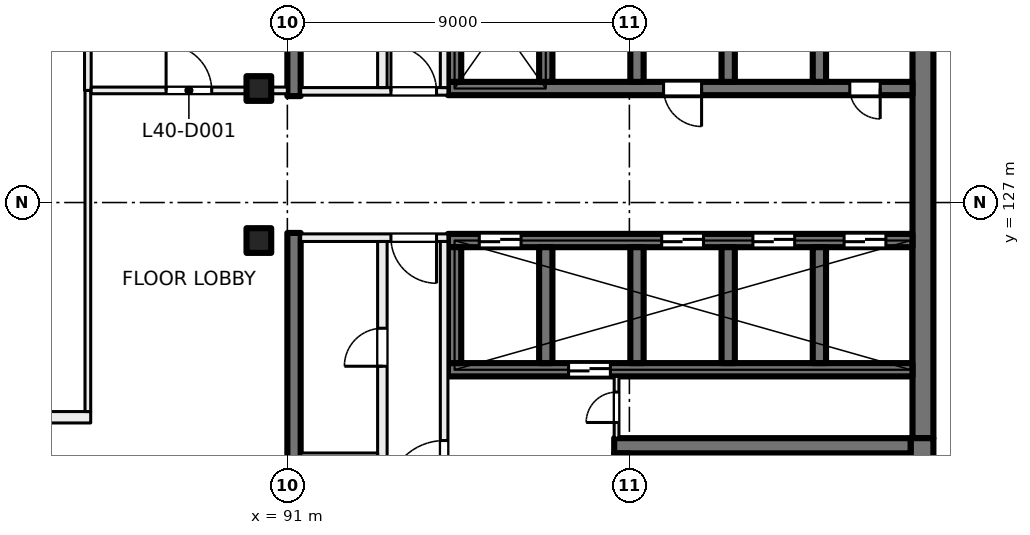
"""IFC4 building model, lengths in metres.
Left out: names, types, materials, properties, quantities, classifications, styles, units other than length and angle.
Written with IfcOpenShell. Run it as: python <this file> out.ifc"""

import sys

from ifc_helpers import new_model, si_unit, direction, frame, frame_2d, origin, origin_2d, place, context, subcontext, project, spatial, rectangle, extrude, element, fill, save


model = new_model("IFC4")
c1 = context("Model", 3, precision=1e-05, world=origin(), true_north=direction((0.0, 1.0)))
c2 = subcontext(c1, "Body", "Model", "MODEL_VIEW")
j1 = project(units=[si_unit("LENGTHUNIT", "METRE"), si_unit("PLANEANGLEUNIT", "RADIAN")], contexts=[c1])
p1 = place(None, origin())
s1 = spatial("IfcSite", under=j1, at=p1, CompositionType="ELEMENT")
p2 = place(p1, origin())
s2 = spatial("IfcBuilding", under=s1, at=p2, CompositionType="ELEMENT")
p3 = place(p2, frame((0.0, 0.0, 170.5)))
s3 = spatial("IfcBuildingStorey", under=s2, at=p3, CompositionType="ELEMENT", Elevation=170.5)
for number, where, z_axis, x_axis in (
    (1, (90.25, 130.0, 0.0), (0.0, 0.0, 1.0), (1.0, 0.0, 0.0)),
    (2, (90.25, 126.0, 0.0), (0.0, 0.0, 1.0), (1.0, 0.0, 0.0)),
):
    element("IfcColumn", number, at=place(p3, frame(where, z_axis=z_axis, x_axis=x_axis)), inside=s3, PredefinedType="COLUMN", context=c2, shape_type="SweptSolid", body=[
        extrude(rectangle(XDim=0.65, YDim=0.65, at=origin_2d()), origin(), (0.0, 0.0, 1.0), 4.0),
    ])
p4 = place(p3, frame((107.725, 135.2, 0.0), z_axis=(0.0, 0.0, 1.0), x_axis=(0.0, -1.0, 0.0)))
e3 = element("IfcWall", 3, at=p4, inside=s3, PredefinedType="SHEAR", context=c2, shape_type="SweptSolid", body=[
    extrude(rectangle(XDim=14.4, YDim=0.55, at=frame_2d((7.2, 0.0))), origin(), (0.0, 0.0, 1.0), 4.0),
])
p5 = place(p3, frame((107.7, 120.8, 0.0), z_axis=(0.0, 0.0, 1.0), x_axis=(0.0, -1.0, 0.0)))
e4 = element("IfcWall", 4, at=p5, inside=s3, PredefinedType="SHEAR", context=c2, shape_type="SweptSolid", body=[
    extrude(rectangle(XDim=3.8, YDim=0.6, at=frame_2d((1.9, 0.0))), origin(), (0.0, 0.0, 1.0), 4.0),
])
p6 = place(p3, frame((107.4, 120.6, 0.0), z_axis=(0.0, 0.0, 1.0), x_axis=(-1.0, 0.0, 0.0)))
e5 = element("IfcWall", 5, at=p6, inside=s3, PredefinedType="SHEAR", context=c2, shape_type="SweptSolid", body=[
    extrude(rectangle(XDim=7.8, YDim=0.4, at=frame_2d((3.9, 0.0))), origin(), (0.0, 0.0, 1.0), 4.0),
])
p7 = place(p3, frame((99.8, 120.4, 0.0), z_axis=(0.0, 0.0, 1.0), x_axis=(0.0, -1.0, 0.0)))
e6 = element("IfcWall", 6, at=p7, inside=s3, PredefinedType="SHEAR", context=c2, shape_type="SweptSolid", body=[
    extrude(rectangle(XDim=2.8, YDim=0.4, at=frame_2d((1.4, 0.0))), origin(), (0.0, 0.0, 1.0), 4.0),
])
p8 = place(p7, frame((0.925, 0.0, 0.0)))
e7 = element("IfcOpeningElement", 7, at=p8, cuts=e6, PredefinedType="OPENING", context=c2, shape_type="SweptSolid", body=[
    extrude(rectangle(XDim=1.0, YDim=2.1, at=frame_2d((0.5, 1.05))), frame((0.0, 0.21, 0.0), z_axis=(0.0, -1.0, 0.0), x_axis=(1.0, 0.0, 0.0)), (0.0, 0.0, 1.0), 0.42),
])
p9 = place(p3, frame((107.45, 130.0, 0.0), z_axis=(0.0, 0.0, 1.0), x_axis=(-1.0, 0.0, 0.0)))
e8 = element("IfcWall", 8, at=p9, inside=s3, PredefinedType="SHEAR", context=c2, shape_type="SweptSolid", body=[
    extrude(rectangle(XDim=12.225, YDim=0.35, at=frame_2d((6.112, 0.0))), origin(), (0.0, 0.0, 1.0), 4.0),
])
p10 = place(p9, frame((0.85, 0.0, 0.0)))
e9 = element("IfcOpeningElement", 9, at=p10, cuts=e8, PredefinedType="OPENING", context=c2, shape_type="SweptSolid", body=[
    extrude(rectangle(XDim=0.8, YDim=2.1, at=frame_2d((0.4, 1.05))), frame((0.0, 0.185, 0.0), z_axis=(0.0, -1.0, 0.0), x_axis=(1.0, 0.0, 0.0)), (0.0, 0.0, 1.0), 0.37),
])
p11 = place(p9, frame((5.55, 0.0, 0.0)))
e10 = element("IfcOpeningElement", 10, at=p11, cuts=e8, PredefinedType="OPENING", context=c2, shape_type="SweptSolid", body=[
    extrude(rectangle(XDim=1.0, YDim=2.1, at=frame_2d((0.5, 1.05))), frame((0.0, 0.185, 0.0), z_axis=(0.0, -1.0, 0.0), x_axis=(1.0, 0.0, 0.0)), (0.0, 0.0, 1.0), 0.37),
])
for number, where, z_axis, x_axis in (
    (11, (105.0, 133.225, 0.0), (0.0, 0.0, 1.0), (0.0, -1.0, 0.0)),
    (12, (102.6, 133.225, 0.0), (0.0, 0.0, 1.0), (0.0, -1.0, 0.0)),
    (13, (100.2, 133.225, 0.0), (0.0, 0.0, 1.0), (0.0, -1.0, 0.0)),
    (14, (97.8, 133.225, 0.0), (0.0, 0.0, 1.0), (0.0, -1.0, 0.0)),
    (15, (95.4, 133.225, 0.0), (0.0, 0.0, 1.0), (0.0, -1.0, 0.0)),
):
    element("IfcWall", number, at=place(p3, frame(where, z_axis=z_axis, x_axis=x_axis)), inside=s3, PredefinedType="SHEAR", context=c2, shape_type="SweptSolid", body=[
        extrude(rectangle(XDim=3.05, YDim=0.35, at=frame_2d((1.525, 0.0))), origin(), (0.0, 0.0, 1.0), 4.0),
    ])
p12 = place(p3, frame((107.45, 126.0, 0.0), z_axis=(0.0, 0.0, 1.0), x_axis=(-1.0, 0.0, 0.0)))
e16 = element("IfcWall", 16, at=p12, inside=s3, PredefinedType="SHEAR", context=c2, shape_type="SweptSolid", body=[
    extrude(rectangle(XDim=12.225, YDim=0.35, at=frame_2d((6.112, 0.0))), origin(), (0.0, 0.0, 1.0), 4.0),
])
p13 = place(p12, frame((0.7, 0.0, 0.0)))
e17 = element("IfcOpeningElement", 17, at=p13, cuts=e16, PredefinedType="OPENING", context=c2, shape_type="SweptSolid", body=[
    extrude(rectangle(XDim=1.1, YDim=2.1, at=frame_2d((0.55, 1.05))), frame((0.0, 0.185, 0.0), z_axis=(0.0, -1.0, 0.0), x_axis=(1.0, 0.0, 0.0)), (0.0, 0.0, 1.0), 0.37),
])
p14 = place(p12, frame((3.1, 0.0, 0.0)))
e18 = element("IfcOpeningElement", 18, at=p14, cuts=e16, PredefinedType="OPENING", context=c2, shape_type="SweptSolid", body=[
    extrude(rectangle(XDim=1.1, YDim=2.1, at=frame_2d((0.55, 1.05))), frame((0.0, 0.185, 0.0), z_axis=(0.0, -1.0, 0.0), x_axis=(1.0, 0.0, 0.0)), (0.0, 0.0, 1.0), 0.37),
])
p15 = place(p12, frame((5.5, 0.0, 0.0)))
e19 = element("IfcOpeningElement", 19, at=p15, cuts=e16, PredefinedType="OPENING", context=c2, shape_type="SweptSolid", body=[
    extrude(rectangle(XDim=1.1, YDim=2.1, at=frame_2d((0.55, 1.05))), frame((0.0, 0.185, 0.0), z_axis=(0.0, -1.0, 0.0), x_axis=(1.0, 0.0, 0.0)), (0.0, 0.0, 1.0), 0.37),
])
p16 = place(p12, frame((10.3, 0.0, 0.0)))
e20 = element("IfcOpeningElement", 20, at=p16, cuts=e16, PredefinedType="OPENING", context=c2, shape_type="SweptSolid", body=[
    extrude(rectangle(XDim=1.1, YDim=2.1, at=frame_2d((0.55, 1.05))), frame((0.0, 0.185, 0.0), z_axis=(0.0, -1.0, 0.0), x_axis=(1.0, 0.0, 0.0)), (0.0, 0.0, 1.0), 0.37),
])
p17 = place(p3, frame((107.45, 122.6, 0.0), z_axis=(0.0, 0.0, 1.0), x_axis=(-1.0, 0.0, 0.0)))
e21 = element("IfcWall", 21, at=p17, inside=s3, PredefinedType="SHEAR", context=c2, shape_type="SweptSolid", body=[
    extrude(rectangle(XDim=12.225, YDim=0.35, at=frame_2d((6.112, 0.0))), origin(), (0.0, 0.0, 1.0), 4.0),
])
p18 = place(p17, frame((7.95, 0.0, 0.0)))
e22 = element("IfcOpeningElement", 22, at=p18, cuts=e21, PredefinedType="OPENING", context=c2, shape_type="SweptSolid", body=[
    extrude(rectangle(XDim=1.1, YDim=2.1, at=frame_2d((0.55, 1.05))), frame((0.0, 0.185, 0.0), z_axis=(0.0, -1.0, 0.0), x_axis=(1.0, 0.0, 0.0)), (0.0, 0.0, 1.0), 0.37),
])
for number, where, z_axis, x_axis in (
    (23, (105.0, 125.825, 0.0), (0.0, 0.0, 1.0), (0.0, -1.0, 0.0)),
    (24, (102.6, 125.825, 0.0), (0.0, 0.0, 1.0), (0.0, -1.0, 0.0)),
    (25, (100.2, 125.825, 0.0), (0.0, 0.0, 1.0), (0.0, -1.0, 0.0)),
    (26, (97.8, 125.825, 0.0), (0.0, 0.0, 1.0), (0.0, -1.0, 0.0)),
    (27, (95.4, 125.825, 0.0), (0.0, 0.0, 1.0), (0.0, -1.0, 0.0)),
):
    element("IfcWall", number, at=place(p3, frame(where, z_axis=z_axis, x_axis=x_axis)), inside=s3, PredefinedType="SHEAR", context=c2, shape_type="SweptSolid", body=[
        extrude(rectangle(XDim=3.05, YDim=0.35, at=frame_2d((1.525, 0.0))), origin(), (0.0, 0.0, 1.0), 4.0),
    ])
for number, where, z_axis, x_axis in (
    (28, (91.175, 138.45, 0.0), (0.0, 0.0, 1.0), (0.0, -1.0, 0.0)),
    (29, (91.175, 126.2, 0.0), (0.0, 0.0, 1.0), (0.0, -1.0, 0.0)),
):
    element("IfcWall", number, at=place(p3, frame(where, z_axis=z_axis, x_axis=x_axis)), inside=s3, PredefinedType="SHEAR", context=c2, shape_type="SweptSolid", body=[
        extrude(rectangle(XDim=8.65, YDim=0.35, at=frame_2d((4.325, 0.0))), origin(), (0.0, 0.0, 1.0), 4.0),
    ])
p19 = place(p3, frame((95.225, 126.075, 0.0), z_axis=(0.0, 0.0, 1.0), x_axis=(-1.0, 0.0, 0.0)))
e30 = element("IfcWall", 30, at=p19, inside=s3, PredefinedType="PARTITIONING", context=c2, shape_type="SweptSolid", body=[
    extrude(rectangle(XDim=3.875, YDim=0.2, at=frame_2d((1.938, 0.0))), origin(), (0.0, 0.0, 1.0), 3.625),
])
p20 = place(p19, frame((0.3, 0.0, 0.0)))
e31 = element("IfcOpeningElement", 31, at=p20, cuts=e30, PredefinedType="OPENING", context=c2, shape_type="SweptSolid", body=[
    extrude(rectangle(XDim=1.2, YDim=2.1, at=frame_2d((0.6, 1.05))), frame((0.0, 0.11, 0.0), z_axis=(0.0, -1.0, 0.0), x_axis=(1.0, 0.0, 0.0)), (0.0, 0.0, 1.0), 0.22),
])
p21 = place(p3, frame((95.125, 117.55, 0.0), z_axis=(0.0, 0.0, 1.0), x_axis=(0.0, 1.0, 0.0)))
e32 = element("IfcWall", 32, at=p21, inside=s3, PredefinedType="PARTITIONING", context=c2, shape_type="SweptSolid", body=[
    extrude(rectangle(XDim=8.425, YDim=0.2, at=frame_2d((4.212, 0.0))), origin(), (0.0, 0.0, 1.0), 3.625),
])
p22 = place(p21, frame((1.688, 0.0, 0.0)))
e33 = element("IfcOpeningElement", 33, at=p22, cuts=e32, PredefinedType="OPENING", context=c2, shape_type="SweptSolid", body=[
    extrude(rectangle(XDim=1.5, YDim=2.1, at=frame_2d((0.75, 1.05))), frame((0.0, 0.11, 0.0), z_axis=(0.0, -1.0, 0.0), x_axis=(1.0, 0.0, 0.0)), (0.0, 0.0, 1.0), 0.22),
])
p23 = place(p3, frame((93.5, 117.55, 0.0), z_axis=(0.0, 0.0, 1.0), x_axis=(0.0, 1.0, 0.0)))
e34 = element("IfcWall", 34, at=p23, inside=s3, PredefinedType="PARTITIONING", context=c2, shape_type="SweptSolid", body=[
    extrude(rectangle(XDim=8.425, YDim=0.25, at=frame_2d((4.212, 0.0))), origin(), (0.0, 0.0, 1.0), 3.625),
])
p24 = place(p23, frame((5.143, 0.0, 0.0)))
e35 = element("IfcOpeningElement", 35, at=p24, cuts=e34, PredefinedType="OPENING", context=c2, shape_type="SweptSolid", body=[
    extrude(rectangle(XDim=1.0, YDim=2.1, at=frame_2d((0.5, 1.05))), frame((0.0, 0.135, 0.0), z_axis=(0.0, -1.0, 0.0), x_axis=(1.0, 0.0, 0.0)), (0.0, 0.0, 1.0), 0.27),
])
p25 = place(p23, frame((0.88, 0.0, 0.0)))
e36 = element("IfcOpeningElement", 36, at=p25, cuts=e34, PredefinedType="OPENING", context=c2, shape_type="SweptSolid", body=[
    extrude(rectangle(XDim=1.0, YDim=2.1, at=frame_2d((0.5, 1.05))), frame((0.0, 0.135, 0.0), z_axis=(0.0, -1.0, 0.0), x_axis=(1.0, 0.0, 0.0)), (0.0, 0.0, 1.0), 0.27),
])
p26 = place(p3, frame((99.663, 120.8, 0.0), z_axis=(0.0, 0.0, 1.0), x_axis=(0.0, 1.0, 0.0)))
e37 = element("IfcWall", 37, at=p26, inside=s3, PredefinedType="PARTITIONING", context=c2, shape_type="SweptSolid", body=[
    extrude(rectangle(XDim=1.625, YDim=0.125, at=frame_2d((0.812, 0.0))), origin(), (0.0, 0.0, 1.0), 3.625),
])
p27 = place(p26, frame((0.413, 0.0, 0.0)))
e38 = element("IfcOpeningElement", 38, at=p27, cuts=e37, PredefinedType="OPENING", context=c2, shape_type="SweptSolid", body=[
    extrude(rectangle(XDim=0.8, YDim=2.1, at=frame_2d((0.4, 1.05))), frame((0.0, 0.073, 0.0), z_axis=(0.0, -1.0, 0.0), x_axis=(1.0, 0.0, 0.0)), (0.0, 0.0, 1.0), 0.145),
])
p28 = place(p3, frame((93.375, 120.36, 0.0), z_axis=(0.0, 0.0, 1.0), x_axis=(-1.0, 0.0, 0.0)))
e39 = element("IfcWall", 39, at=p28, inside=s3, PredefinedType="PARTITIONING", context=c2, shape_type="SweptSolid", body=[
    extrude(rectangle(XDim=2.025, YDim=0.1, at=frame_2d((1.012, 0.0))), origin(), (0.0, 0.0, 1.0), 3.625),
])
p29 = place(p3, frame((91.35, 129.925, 0.0), z_axis=(0.0, 0.0, 1.0), x_axis=(1.0, 0.0, 0.0)))
e40 = element("IfcWall", 40, at=p29, inside=s3, PredefinedType="PARTITIONING", context=c2, shape_type="SweptSolid", body=[
    extrude(rectangle(XDim=3.875, YDim=0.2, at=frame_2d((1.938, 0.0))), origin(), (0.0, 0.0, 1.0), 3.625),
])
p30 = place(p29, frame((2.375, 0.0, 0.0)))
e41 = element("IfcOpeningElement", 41, at=p30, cuts=e40, PredefinedType="OPENING", context=c2, shape_type="SweptSolid", body=[
    extrude(rectangle(XDim=1.2, YDim=2.1, at=frame_2d((0.6, 1.05))), frame((0.0, 0.11, 0.0), z_axis=(0.0, -1.0, 0.0), x_axis=(1.0, 0.0, 0.0)), (0.0, 0.0, 1.0), 0.22),
])
p31 = place(p3, frame((95.125, 130.025, 0.0), z_axis=(0.0, 0.0, 1.0), x_axis=(0.0, 1.0, 0.0)))
e42 = element("IfcWall", 42, at=p31, inside=s3, PredefinedType="PARTITIONING", context=c2, shape_type="SweptSolid", body=[
    extrude(rectangle(XDim=8.425, YDim=0.2, at=frame_2d((4.212, 0.0))), origin(), (0.0, 0.0, 1.0), 3.625),
])
p32 = place(p31, frame((5.238, 0.0, 0.0)))
e43 = element("IfcOpeningElement", 43, at=p32, cuts=e42, PredefinedType="OPENING", context=c2, shape_type="SweptSolid", body=[
    extrude(rectangle(XDim=1.5, YDim=2.1, at=frame_2d((0.75, 1.05))), frame((0.0, 0.11, 0.0), z_axis=(0.0, -1.0, 0.0), x_axis=(1.0, 0.0, 0.0)), (0.0, 0.0, 1.0), 0.22),
])
p33 = place(p3, frame((93.5, 130.025, 0.0), z_axis=(0.0, 0.0, 1.0), x_axis=(0.0, 1.0, 0.0)))
e44 = element("IfcWall", 44, at=p33, inside=s3, PredefinedType="PARTITIONING", context=c2, shape_type="SweptSolid", body=[
    extrude(rectangle(XDim=8.425, YDim=0.25, at=frame_2d((4.212, 0.0))), origin(), (0.0, 0.0, 1.0), 3.625),
])
p34 = place(p33, frame((1.683, 0.0, 0.0)))
e45 = element("IfcOpeningElement", 45, at=p34, cuts=e44, PredefinedType="OPENING", context=c2, shape_type="SweptSolid", body=[
    extrude(rectangle(XDim=0.8, YDim=2.1, at=frame_2d((0.4, 1.05))), frame((0.0, 0.135, 0.0), z_axis=(0.0, -1.0, 0.0), x_axis=(1.0, 0.0, 0.0)), (0.0, 0.0, 1.0), 0.27),
])
p35 = place(p33, frame((5.945, 0.0, 0.0)))
e46 = element("IfcOpeningElement", 46, at=p35, cuts=e44, PredefinedType="OPENING", context=c2, shape_type="SweptSolid", body=[
    extrude(rectangle(XDim=0.8, YDim=2.1, at=frame_2d((0.4, 1.05))), frame((0.0, 0.135, 0.0), z_axis=(0.0, -1.0, 0.0), x_axis=(1.0, 0.0, 0.0)), (0.0, 0.0, 1.0), 0.27),
])
p36 = place(p3, frame((50.506, 121.35, 0.0), z_axis=(0.0, 0.0, 1.0), x_axis=(1.0, 0.0, 0.0)))
e47 = element("IfcWall", 47, at=p36, inside=s3, PredefinedType="PARTITIONING", context=c2, shape_type="SweptSolid", body=[
    extrude(rectangle(XDim=35.319, YDim=0.3, at=frame_2d((17.659, 0.0))), origin(), (0.0, 0.0, 1.0), 3.625),
])
p37 = place(p36, frame((13.844, 0.0, 0.0)))
e48 = element("IfcOpeningElement", 48, at=p37, cuts=e47, PredefinedType="OPENING", context=c2, shape_type="SweptSolid", body=[
    extrude(rectangle(XDim=0.8, YDim=2.1, at=frame_2d((0.4, 1.05))), frame((0.0, 0.16, 0.0), z_axis=(0.0, -1.0, 0.0), x_axis=(1.0, 0.0, 0.0)), (0.0, 0.0, 1.0), 0.32),
])
p38 = place(p36, frame((9.144, 0.0, 0.0)))
e49 = element("IfcOpeningElement", 49, at=p38, cuts=e47, PredefinedType="OPENING", context=c2, shape_type="SweptSolid", body=[
    extrude(rectangle(XDim=1.2, YDim=2.1, at=frame_2d((0.6, 1.05))), frame((0.0, 0.16, 0.0), z_axis=(0.0, -1.0, 0.0), x_axis=(1.0, 0.0, 0.0)), (0.0, 0.0, 1.0), 0.32),
])
p39 = place(p36, frame((24.594, 0.0, 0.0)))
e50 = element("IfcOpeningElement", 50, at=p39, cuts=e47, PredefinedType="OPENING", context=c2, shape_type="SweptSolid", body=[
    extrude(rectangle(XDim=1.8, YDim=2.1, at=frame_2d((0.9, 1.05))), frame((0.0, 0.16, 0.0), z_axis=(0.0, -1.0, 0.0), x_axis=(1.0, 0.0, 0.0)), (0.0, 0.0, 1.0), 0.32),
])
p40 = place(p36, frame((2.543, 0.0, 0.0)))
e51 = element("IfcOpeningElement", 51, at=p40, cuts=e47, PredefinedType="OPENING", context=c2, shape_type="SweptSolid", body=[
    extrude(rectangle(XDim=1.8, YDim=2.1, at=frame_2d((0.9, 1.05))), frame((0.0, 0.16, 0.0), z_axis=(0.0, -1.0, 0.0), x_axis=(1.0, 0.0, 0.0)), (0.0, 0.0, 1.0), 0.32),
])
p41 = place(p3, frame((85.75, 121.5, 0.0), z_axis=(0.0, 0.0, 1.0), x_axis=(0.0, 1.0, 0.0)))
e52 = element("IfcWall", 52, at=p41, inside=s3, PredefinedType="PARTITIONING", context=c2, shape_type="SweptSolid", body=[
    extrude(rectangle(XDim=8.45, YDim=0.15, at=frame_2d((4.225, 0.0))), origin(), (0.0, 0.0, 1.0), 3.625),
])
p42 = place(p3, frame((85.75, 129.95, 0.0), z_axis=(0.0, 0.0, 1.0), x_axis=(0.0, 1.0, 0.0)))
e53 = element("IfcWall", 53, at=p42, inside=s3, PredefinedType="PARTITIONING", context=c2, shape_type="SweptSolid", body=[
    extrude(rectangle(XDim=8.45, YDim=0.175, at=frame_2d((4.225, 0.0))), origin(), (0.0, 0.0, 1.0), 3.625),
])
p43 = place(p3, frame((85.838, 129.95, 0.0), z_axis=(0.0, 0.0, 1.0), x_axis=(1.0, 0.0, 0.0)))
e54 = element("IfcWall", 54, at=p43, inside=s3, PredefinedType="PARTITIONING", context=c2, shape_type="SweptSolid", body=[
    extrude(rectangle(XDim=5.162, YDim=0.175, at=frame_2d((2.581, 0.0))), origin(), (0.0, 0.0, 1.0), 3.625),
])
p44 = place(p43, frame((1.971, 0.0, 0.0)))
e55 = element("IfcOpeningElement", 55, at=p44, cuts=e54, PredefinedType="OPENING", context=c2, shape_type="SweptSolid", body=[
    extrude(rectangle(XDim=1.2, YDim=2.1, at=frame_2d((0.6, 1.05))), frame((0.0, 0.097, 0.0), z_axis=(0.0, -1.0, 0.0), x_axis=(1.0, 0.0, 0.0)), (0.0, 0.0, 1.0), 0.195),
])
p45 = place(p13, origin())
e56 = element("IfcDoor", 56, at=p45, inside=s3, OperationType="DOUBLE_DOOR_SLIDING", PredefinedType="DOOR", context=c2, shape_type="SweptSolid", body=[
    extrude(rectangle(XDim=1.1, YDim=2.1, at=frame_2d((0.55, 1.05))), frame((0.0, 0.025, 0.0), z_axis=(0.0, -1.0, 0.0), x_axis=(1.0, 0.0, 0.0)), (0.0, 0.0, 1.0), 0.05),
])
fill(e17, e56)
p46 = place(p14, origin())
e57 = element("IfcDoor", 57, at=p46, inside=s3, OperationType="DOUBLE_DOOR_SLIDING", PredefinedType="DOOR", context=c2, shape_type="SweptSolid", body=[
    extrude(rectangle(XDim=1.1, YDim=2.1, at=frame_2d((0.55, 1.05))), frame((0.0, 0.025, 0.0), z_axis=(0.0, -1.0, 0.0), x_axis=(1.0, 0.0, 0.0)), (0.0, 0.0, 1.0), 0.05),
])
fill(e18, e57)
p47 = place(p15, origin())
e58 = element("IfcDoor", 58, at=p47, inside=s3, OperationType="DOUBLE_DOOR_SLIDING", PredefinedType="DOOR", context=c2, shape_type="SweptSolid", body=[
    extrude(rectangle(XDim=1.1, YDim=2.1, at=frame_2d((0.55, 1.05))), frame((0.0, 0.025, 0.0), z_axis=(0.0, -1.0, 0.0), x_axis=(1.0, 0.0, 0.0)), (0.0, 0.0, 1.0), 0.05),
])
fill(e19, e58)
p48 = place(p16, origin())
e59 = element("IfcDoor", 59, at=p48, inside=s3, OperationType="DOUBLE_DOOR_SLIDING", PredefinedType="DOOR", context=c2, shape_type="SweptSolid", body=[
    extrude(rectangle(XDim=1.1, YDim=2.1, at=frame_2d((0.55, 1.05))), frame((0.0, 0.025, 0.0), z_axis=(0.0, -1.0, 0.0), x_axis=(1.0, 0.0, 0.0)), (0.0, 0.0, 1.0), 0.05),
])
fill(e20, e59)
p49 = place(p10, origin())
e60 = element("IfcDoor", 60, at=p49, inside=s3, OperationType="SINGLE_SWING_LEFT", PredefinedType="DOOR", context=c2, shape_type="SweptSolid", body=[
    extrude(rectangle(XDim=0.8, YDim=2.1, at=frame_2d((0.4, 1.05))), frame((0.0, 0.025, 0.0), z_axis=(0.0, -1.0, 0.0), x_axis=(1.0, 0.0, 0.0)), (0.0, 0.0, 1.0), 0.05),
])
fill(e9, e60)
p50 = place(p11, origin())
e61 = element("IfcDoor", 61, at=p50, inside=s3, OperationType="SINGLE_SWING_RIGHT", PredefinedType="DOOR", context=c2, shape_type="SweptSolid", body=[
    extrude(rectangle(XDim=1.0, YDim=2.1, at=frame_2d((0.5, 1.05))), frame((0.0, 0.025, 0.0), z_axis=(0.0, -1.0, 0.0), x_axis=(1.0, 0.0, 0.0)), (0.0, 0.0, 1.0), 0.05),
])
fill(e10, e61)
p51 = place(p20, origin())
e62 = element("IfcDoor", 62, at=p51, inside=s3, OperationType="DOUBLE_DOOR_SINGLE_SWING", PredefinedType="DOOR", context=c2, shape_type="SweptSolid", body=[
    extrude(rectangle(XDim=1.2, YDim=2.1, at=frame_2d((0.6, 1.05))), frame((0.0, 0.025, 0.0), z_axis=(0.0, -1.0, 0.0), x_axis=(1.0, 0.0, 0.0)), (0.0, 0.0, 1.0), 0.05),
])
fill(e31, e62)
p52 = place(p22, origin())
e63 = element("IfcDoor", 63, at=p52, inside=s3, OperationType="DOUBLE_DOOR_SINGLE_SWING", PredefinedType="DOOR", context=c2, shape_type="SweptSolid", body=[
    extrude(rectangle(XDim=1.5, YDim=2.1, at=frame_2d((0.75, 1.05))), frame((0.0, 0.025, 0.0), z_axis=(0.0, -1.0, 0.0), x_axis=(1.0, 0.0, 0.0)), (0.0, 0.0, 1.0), 0.05),
])
fill(e33, e63)
p53 = place(p27, origin())
e64 = element("IfcDoor", 64, at=p53, inside=s3, OperationType="SINGLE_SWING_RIGHT", PredefinedType="DOOR", context=c2, shape_type="SweptSolid", body=[
    extrude(rectangle(XDim=0.8, YDim=2.1, at=frame_2d((0.4, 1.05))), frame((0.0, 0.025, 0.0), z_axis=(0.0, -1.0, 0.0), x_axis=(1.0, 0.0, 0.0)), (0.0, 0.0, 1.0), 0.05),
])
fill(e38, e64)
p54 = place(p24, origin())
e65 = element("IfcDoor", 65, at=p54, inside=s3, OperationType="SINGLE_SWING_LEFT", PredefinedType="DOOR", context=c2, shape_type="SweptSolid", body=[
    extrude(rectangle(XDim=1.0, YDim=2.1, at=frame_2d((0.5, 1.05))), frame((0.0, 0.025, 0.0), z_axis=(0.0, -1.0, 0.0), x_axis=(1.0, 0.0, 0.0)), (0.0, 0.0, 1.0), 0.05),
])
fill(e35, e65)
p55 = place(p30, origin())
e66 = element("IfcDoor", 66, at=p55, inside=s3, OperationType="DOUBLE_DOOR_SINGLE_SWING", PredefinedType="DOOR", context=c2, shape_type="SweptSolid", body=[
    extrude(rectangle(XDim=1.2, YDim=2.1, at=frame_2d((0.6, 1.05))), frame((0.0, 0.025, 0.0), z_axis=(0.0, -1.0, 0.0), x_axis=(1.0, 0.0, 0.0)), (0.0, 0.0, 1.0), 0.05),
])
fill(e41, e66)
p56 = place(p18, origin())
e67 = element("IfcDoor", 67, at=p56, inside=s3, OperationType="DOUBLE_DOOR_SLIDING", PredefinedType="DOOR", context=c2, shape_type="SweptSolid", body=[
    extrude(rectangle(XDim=1.1, YDim=2.1, at=frame_2d((0.55, 1.05))), frame((0.0, 0.025, 0.0), z_axis=(0.0, -1.0, 0.0), x_axis=(1.0, 0.0, 0.0)), (0.0, 0.0, 1.0), 0.05),
])
fill(e22, e67)
p57 = place(p44, origin())
e68 = element("IfcDoor", 68, at=p57, inside=s3, OperationType="DOUBLE_DOOR_SINGLE_SWING", PredefinedType="DOOR", context=c2, shape_type="SweptSolid", body=[
    extrude(rectangle(XDim=1.2, YDim=2.1, at=frame_2d((0.6, 1.05))), frame((0.0, 0.025, 0.0), z_axis=(0.0, -1.0, 0.0), x_axis=(1.0, 0.0, 0.0)), (0.0, 0.0, 1.0), 0.05),
])
fill(e55, e68)
save(model, sys.argv[1])
